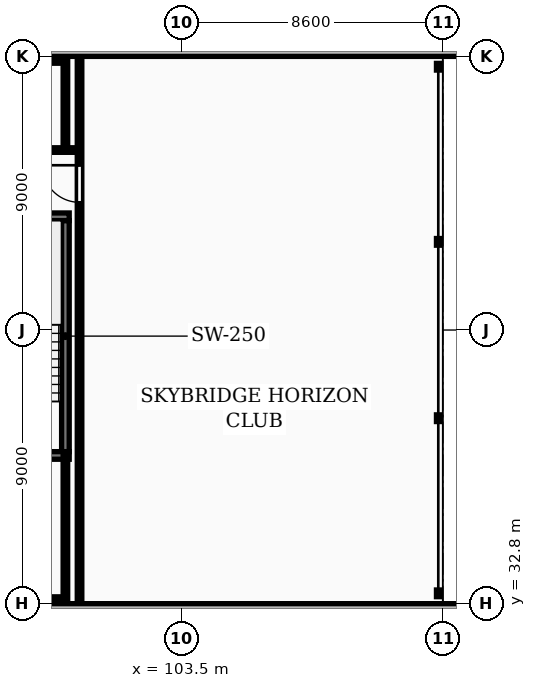
"""IFC4 building model, lengths in metres.
Left out: names, types, materials, properties, quantities, classifications, styles, units other than length and angle.
Written with IfcOpenShell. Run it as: python <this file> out.ifc"""

import sys

from ifc_helpers import new_model, si_unit, direction, frame, frame_2d, origin, place, context, subcontext, project, spatial, rectangle, extrude, element, fill, save


model = new_model("IFC4")
c1 = context("Model", 3, precision=1e-05, world=origin(), true_north=direction((0.0, 1.0)))
c2 = subcontext(c1, "Body", "Model", "MODEL_VIEW")
j1 = project(units=[si_unit("LENGTHUNIT", "METRE"), si_unit("PLANEANGLEUNIT", "RADIAN")], contexts=[c1])
p1 = place(None, origin())
s1 = spatial("IfcSite", under=j1, at=p1, CompositionType="ELEMENT")
p2 = place(p1, origin())
s2 = spatial("IfcBuilding", under=s1, at=p2, CompositionType="ELEMENT")
p3 = place(p2, frame((0.0, 0.0, 139.3)))
s3 = spatial("IfcBuildingStorey", under=s2, at=p3, CompositionType="ELEMENT", Elevation=139.3)
p4 = place(p3, frame((57.6, 50.95, 0.0), z_axis=(0.0, 0.0, 1.0), x_axis=(1.0, 0.0, 0.0)))
e1 = element("IfcWall", 1, at=p4, inside=s3, PredefinedType="STANDARD", context=c2, shape_type="SweptSolid", body=[
    extrude(rectangle(XDim=73.0, YDim=0.3, at=frame_2d((36.5, 0.0))), origin(), (0.0, 0.0, 1.0), 3.31),
])
p5 = place(p4, frame((15.225, 0.0, 0.85)))
e2 = element("IfcOpeningElement", 2, at=p5, cuts=e1, PredefinedType="OPENING", context=c2, shape_type="SweptSolid", body=[
    extrude(rectangle(XDim=1.8, YDim=1.8, at=frame_2d((0.9, 0.9))), frame((0.0, 0.16, 0.0), z_axis=(0.0, -1.0, 0.0), x_axis=(1.0, 0.0, 0.0)), (0.0, 0.0, 1.0), 0.32),
])
p6 = place(p4, frame((58.575, 0.0, 0.85)))
e3 = element("IfcOpeningElement", 3, at=p6, cuts=e1, PredefinedType="OPENING", context=c2, shape_type="SweptSolid", body=[
    extrude(rectangle(XDim=1.8, YDim=1.8, at=frame_2d((0.9, 0.9))), frame((0.0, 0.16, 0.0), z_axis=(0.0, -1.0, 0.0), x_axis=(1.0, 0.0, 0.0)), (0.0, 0.0, 1.0), 0.32),
])
p7 = place(p4, frame((33.45, 0.0, 0.0)))
e4 = element("IfcOpeningElement", 4, at=p7, cuts=e1, PredefinedType="OPENING", context=c2, shape_type="SweptSolid", body=[
    extrude(rectangle(XDim=1.1, YDim=2.1, at=frame_2d((0.55, 1.05))), frame((0.0, 0.16, 0.0), z_axis=(0.0, -1.0, 0.0), x_axis=(1.0, 0.0, 0.0)), (0.0, 0.0, 1.0), 0.32),
])
p8 = place(p3, frame((130.7, 32.65, 0.0), z_axis=(0.0, 0.0, 1.0), x_axis=(-1.0, 0.0, 0.0)))
e5 = element("IfcWall", 5, at=p8, inside=s3, PredefinedType="STANDARD", context=c2, shape_type="SweptSolid", body=[
    extrude(rectangle(XDim=58.0, YDim=0.3, at=frame_2d((29.0, 0.0))), origin(), (0.0, 0.0, 1.0), 3.31),
])
p9 = place(p8, frame((50.125, 0.0, 0.85)))
e6 = element("IfcOpeningElement", 6, at=p9, cuts=e5, PredefinedType="OPENING", context=c2, shape_type="SweptSolid", body=[
    extrude(rectangle(XDim=1.8, YDim=1.8, at=frame_2d((0.9, 0.9))), frame((0.0, 0.16, 0.0), z_axis=(0.0, -1.0, 0.0), x_axis=(1.0, 0.0, 0.0)), (0.0, 0.0, 1.0), 0.32),
])
p10 = place(p8, frame((6.775, 0.0, 0.85)))
e7 = element("IfcOpeningElement", 7, at=p10, cuts=e5, PredefinedType="OPENING", context=c2, shape_type="SweptSolid", body=[
    extrude(rectangle(XDim=1.8, YDim=1.8, at=frame_2d((0.9, 0.9))), frame((0.0, 0.16, 0.0), z_axis=(0.0, -1.0, 0.0), x_axis=(1.0, 0.0, 0.0)), (0.0, 0.0, 1.0), 0.32),
])
p11 = place(p8, frame((38.0, 0.0, 0.0)))
e8 = element("IfcOpeningElement", 8, at=p11, cuts=e5, PredefinedType="OPENING", context=c2, shape_type="SweptSolid", body=[
    extrude(rectangle(XDim=1.1, YDim=2.1, at=frame_2d((0.55, 1.05))), frame((0.0, 0.16, 0.0), z_axis=(0.0, -1.0, 0.0), x_axis=(1.0, 0.0, 0.0)), (0.0, 0.0, 1.0), 0.32),
])
p12 = place(p3, frame((99.685, 37.8, 0.0), z_axis=(0.0, 0.0, 1.0), x_axis=(0.0, 1.0, 0.0)))
e9 = element("IfcWall", 9, at=p12, inside=s3, PredefinedType="SHEAR", context=c2, shape_type="SweptSolid", body=[
    extrude(rectangle(XDim=7.6, YDim=0.25, at=frame_2d((3.8, 0.0))), origin(), (0.0, 0.0, 1.0), 3.6),
])
for number, where, z_axis, x_axis in (
    (10, (96.25, 37.675, 0.0), (0.0, 0.0, 1.0), (1.0, 0.0, 0.0)),
    (11, (96.25, 45.525, 0.0), (0.0, 0.0, 1.0), (1.0, 0.0, 0.0)),
):
    element("IfcWall", number, at=place(p3, frame(where, z_axis=z_axis, x_axis=x_axis)), inside=s3, PredefinedType="SHEAR", context=c2, shape_type="SweptSolid", body=[
        extrude(rectangle(XDim=3.56, YDim=0.25, at=frame_2d((1.78, 0.0))), origin(), (0.0, 0.0, 1.0), 3.6),
    ])
for number, where, z_axis, x_axis in (
    (12, (96.375, 32.95, 0.0), (0.0, 0.0, 1.0), (1.0, 0.0, 0.0)),
    (13, (96.375, 50.65, 0.0), (0.0, 0.0, 1.0), (1.0, 0.0, 0.0)),
):
    element("IfcWall", number, at=place(p3, frame(where, z_axis=z_axis, x_axis=x_axis)), inside=s3, PredefinedType="PARTITIONING", context=c2, shape_type="SweptSolid", body=[
        extrude(rectangle(XDim=3.31, YDim=0.15, at=frame_2d((1.655, 0.0))), origin(), (0.0, 0.0, 1.0), 2.69),
    ])
p13 = place(p3, frame((96.375, 47.72, 0.0), z_axis=(0.0, 0.0, 1.0), x_axis=(1.0, 0.0, 0.0)))
e14 = element("IfcWall", 14, at=p13, inside=s3, PredefinedType="PARTITIONING", context=c2, shape_type="SweptSolid", body=[
    extrude(rectangle(XDim=3.775, YDim=0.15, at=frame_2d((1.887, 0.0))), origin(), (0.0, 0.0, 1.0), 3.31),
])
p14 = place(p3, frame((99.685, 32.95, 0.0), z_axis=(0.0, 0.0, 1.0), x_axis=(0.0, 1.0, 0.0)))
e15 = element("IfcWall", 15, at=p14, inside=s3, PredefinedType="PARTITIONING", context=c2, shape_type="SweptSolid", body=[
    extrude(rectangle(XDim=4.725, YDim=0.15, at=frame_2d((2.363, 0.0))), origin(), (0.0, 0.0, 1.0), 2.383),
])
p15 = place(p3, frame((99.685, 47.72, 0.0), z_axis=(0.0, 0.0, 1.0), x_axis=(0.0, 1.0, 0.0)))
e16 = element("IfcWall", 16, at=p15, inside=s3, PredefinedType="PARTITIONING", context=c2, shape_type="SweptSolid", body=[
    extrude(rectangle(XDim=2.93, YDim=0.15, at=frame_2d((1.465, 0.0))), origin(), (0.0, 0.0, 1.0), 2.383),
])
p16 = place(p3, frame((100.15, 32.9, 0.0), z_axis=(0.0, 0.0, 1.0), x_axis=(0.0, 1.0, 0.0)))
e17 = element("IfcWall", 17, at=p16, inside=s3, PredefinedType="PARTITIONING", context=c2, shape_type="SweptSolid", body=[
    extrude(rectangle(XDim=17.8, YDim=0.15, at=frame_2d((8.9, 0.0))), origin(), (0.0, 0.0, 1.0), 3.31),
])
p17 = place(p16, frame((13.1, 0.0, 0.0)))
e18 = element("IfcOpeningElement", 18, at=p17, cuts=e17, PredefinedType="OPENING", context=c2, shape_type="SweptSolid", body=[
    extrude(rectangle(XDim=1.22, YDim=2.18, at=frame_2d((0.61, 1.09))), frame((0.0, 0.085, 0.0), z_axis=(0.0, -1.0, 0.0), x_axis=(1.0, 0.0, 0.0)), (0.0, 0.0, 1.0), 0.17),
])
p18 = place(p17, origin())
e19 = element("IfcDoor", 19, at=p18, inside=s3, OperationType="SINGLE_SWING_RIGHT", PredefinedType="DOOR", context=c2, shape_type="SweptSolid", body=[
    extrude(rectangle(XDim=1.22, YDim=2.18, at=frame_2d((0.61, 1.09))), frame((0.0, 0.025, 0.0), z_axis=(0.0, -1.0, 0.0), x_axis=(1.0, 0.0, 0.0)), (0.0, 0.0, 1.0), 0.05),
])
fill(e18, e19)
save(model, sys.argv[1])
